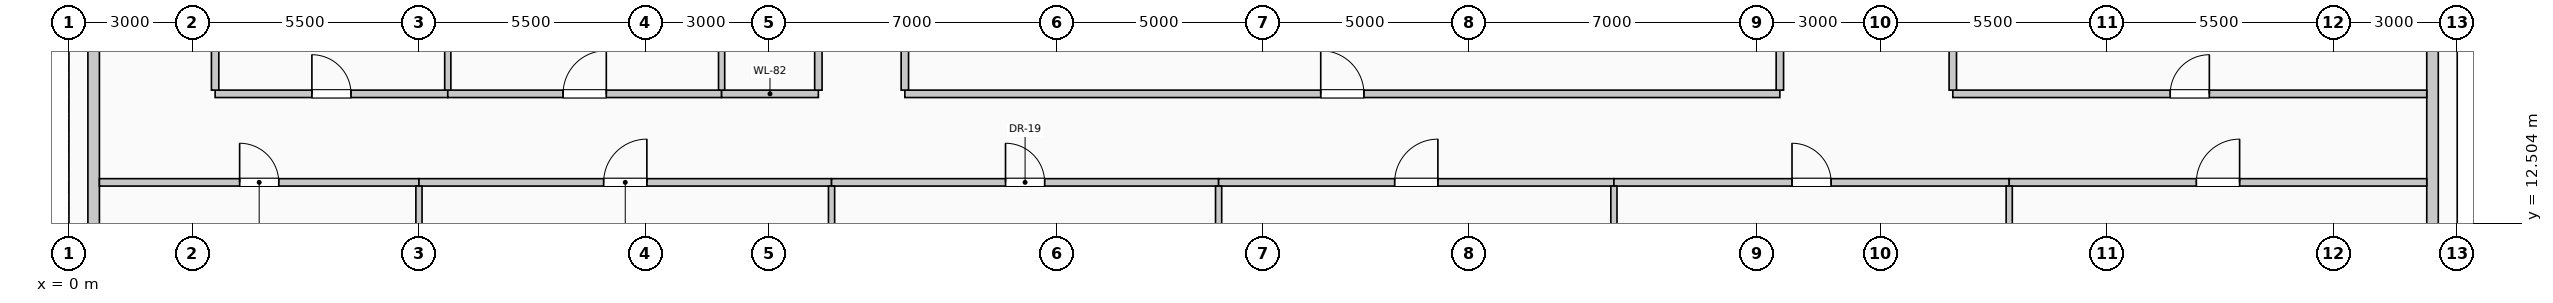
"""IFC4 building model, lengths in metres.
Left out: names, types, materials, properties, quantities, classifications, styles, units other than length and angle.
Written with IfcOpenShell. Run it as: python <this file> out.ifc"""

import sys

from ifc_helpers import new_model, si_unit, direction, frame, frame_2d, origin, place, context, subcontext, project, spatial, rectangle, extrude, element, fill, save


model = new_model("IFC4")
c1 = context("Model", 3, precision=1e-05, world=origin(), true_north=direction((0.0, 1.0)))
c2 = subcontext(c1, "Body", "Model", "MODEL_VIEW")
j1 = project(units=[si_unit("LENGTHUNIT", "METRE"), si_unit("PLANEANGLEUNIT", "RADIAN")], contexts=[c1])
p1 = place(None, origin())
s1 = spatial("IfcSite", under=j1, at=p1, CompositionType="ELEMENT")
p2 = place(p1, origin())
s2 = spatial("IfcBuilding", under=s1, at=p2, CompositionType="ELEMENT")
p3 = place(p2, frame((0.0, 0.0, 96.6)))
s3 = spatial("IfcBuildingStorey", under=s2, at=p3, CompositionType="ELEMENT", Elevation=96.6)
for number, where, z_axis, x_axis in (
    (1, (0.6, 10.445, 0.0), (0.0, 0.0, 1.0), (0.0, 1.0, 0.0)),
    (2, (57.4, 17.555, 0.0), (0.0, 0.0, 1.0), (0.0, -1.0, 0.0)),
):
    element("IfcWall", number, at=place(p3, frame(where, z_axis=z_axis, x_axis=x_axis)), inside=s3, PredefinedType="SOLIDWALL", context=c2, shape_type="SweptSolid", body=[
        extrude(rectangle(XDim=7.11, YDim=0.28, at=frame_2d((3.555, 0.0))), origin(), (0.0, 0.0, 1.0), 2.875),
    ])
p4 = place(p3, frame((0.74, 13.5, 0.0), z_axis=(0.0, 0.0, 1.0), x_axis=(1.0, 0.0, 0.0)))
e3 = element("IfcWall", 3, at=p4, inside=s3, PredefinedType="PARTITIONING", context=c2, shape_type="SweptSolid", body=[
    extrude(rectangle(XDim=7.76, YDim=0.18, at=frame_2d((3.88, 0.0))), origin(), (0.0, 0.0, 1.0), 3.725),
])
p5 = place(p4, frame((3.405, 0.0, 0.0)))
e4 = element("IfcOpeningElement", 4, at=p5, cuts=e3, PredefinedType="OPENING", context=c2, shape_type="SweptSolid", body=[
    extrude(rectangle(XDim=0.95, YDim=2.15, at=frame_2d((0.475, 1.075))), frame((0.0, 0.1, 0.0), z_axis=(0.0, -1.0, 0.0), x_axis=(1.0, 0.0, 0.0)), (0.0, 0.0, 1.0), 0.2),
])
p6 = place(p3, frame((8.5, 13.5, 0.0), z_axis=(0.0, 0.0, 1.0), x_axis=(1.0, 0.0, 0.0)))
e5 = element("IfcWall", 5, at=p6, inside=s3, PredefinedType="PARTITIONING", context=c2, shape_type="SweptSolid", body=[
    extrude(rectangle(XDim=10.02, YDim=0.18, at=frame_2d((5.01, 0.0))), origin(), (0.0, 0.0, 1.0), 3.725),
])
p7 = place(p6, frame((4.485, 0.0, 0.0)))
e6 = element("IfcOpeningElement", 6, at=p7, cuts=e5, PredefinedType="OPENING", context=c2, shape_type="SweptSolid", body=[
    extrude(rectangle(XDim=1.05, YDim=2.15, at=frame_2d((0.525, 1.075))), frame((0.0, 0.1, 0.0), z_axis=(0.0, -1.0, 0.0), x_axis=(1.0, 0.0, 0.0)), (0.0, 0.0, 1.0), 0.2),
])
p8 = place(p3, frame((18.52, 13.5, 0.0), z_axis=(0.0, 0.0, 1.0), x_axis=(1.0, 0.0, 0.0)))
e7 = element("IfcWall", 7, at=p8, inside=s3, PredefinedType="PARTITIONING", context=c2, shape_type="SweptSolid", body=[
    extrude(rectangle(XDim=9.4, YDim=0.18, at=frame_2d((4.7, 0.0))), origin(), (0.0, 0.0, 1.0), 3.725),
])
p9 = place(p8, frame((4.225, 0.0, 0.0)))
e8 = element("IfcOpeningElement", 8, at=p9, cuts=e7, PredefinedType="OPENING", context=c2, shape_type="SweptSolid", body=[
    extrude(rectangle(XDim=0.95, YDim=2.15, at=frame_2d((0.475, 1.075))), frame((0.0, 0.1, 0.0), z_axis=(0.0, -1.0, 0.0), x_axis=(1.0, 0.0, 0.0)), (0.0, 0.0, 1.0), 0.2),
])
p10 = place(p3, frame((27.92, 13.5, 0.0), z_axis=(0.0, 0.0, 1.0), x_axis=(1.0, 0.0, 0.0)))
e9 = element("IfcWall", 9, at=p10, inside=s3, PredefinedType="PARTITIONING", context=c2, shape_type="SweptSolid", body=[
    extrude(rectangle(XDim=9.6, YDim=0.18, at=frame_2d((4.8, 0.0))), origin(), (0.0, 0.0, 1.0), 3.725),
])
p11 = place(p10, frame((4.275, 0.0, 0.0)))
e10 = element("IfcOpeningElement", 10, at=p11, cuts=e9, PredefinedType="OPENING", context=c2, shape_type="SweptSolid", body=[
    extrude(rectangle(XDim=1.05, YDim=2.15, at=frame_2d((0.525, 1.075))), frame((0.0, 0.1, 0.0), z_axis=(0.0, -1.0, 0.0), x_axis=(1.0, 0.0, 0.0)), (0.0, 0.0, 1.0), 0.2),
])
p12 = place(p3, frame((37.52, 13.5, 0.0), z_axis=(0.0, 0.0, 1.0), x_axis=(1.0, 0.0, 0.0)))
e11 = element("IfcWall", 11, at=p12, inside=s3, PredefinedType="PARTITIONING", context=c2, shape_type="SweptSolid", body=[
    extrude(rectangle(XDim=9.6, YDim=0.18, at=frame_2d((4.8, 0.0))), origin(), (0.0, 0.0, 1.0), 3.725),
])
p13 = place(p12, frame((4.325, 0.0, 0.0)))
e12 = element("IfcOpeningElement", 12, at=p13, cuts=e11, PredefinedType="OPENING", context=c2, shape_type="SweptSolid", body=[
    extrude(rectangle(XDim=0.95, YDim=2.15, at=frame_2d((0.475, 1.075))), frame((0.0, 0.1, 0.0), z_axis=(0.0, -1.0, 0.0), x_axis=(1.0, 0.0, 0.0)), (0.0, 0.0, 1.0), 0.2),
])
p14 = place(p3, frame((47.12, 13.5, 0.0), z_axis=(0.0, 0.0, 1.0), x_axis=(1.0, 0.0, 0.0)))
e13 = element("IfcWall", 13, at=p14, inside=s3, PredefinedType="PARTITIONING", context=c2, shape_type="SweptSolid", body=[
    extrude(rectangle(XDim=10.14, YDim=0.18, at=frame_2d((5.07, 0.0))), origin(), (0.0, 0.0, 1.0), 3.725),
])
p15 = place(p14, frame((4.545, 0.0, 0.0)))
e14 = element("IfcOpeningElement", 14, at=p15, cuts=e13, PredefinedType="OPENING", context=c2, shape_type="SweptSolid", body=[
    extrude(rectangle(XDim=1.05, YDim=2.15, at=frame_2d((0.525, 1.075))), frame((0.0, 0.1, 0.0), z_axis=(0.0, -1.0, 0.0), x_axis=(1.0, 0.0, 0.0)), (0.0, 0.0, 1.0), 0.2),
])
p16 = place(p3, frame((3.55, 15.65, 0.0), z_axis=(0.0, 0.0, 1.0), x_axis=(1.0, 0.0, 0.0)))
e15 = element("IfcWall", 15, at=p16, inside=s3, PredefinedType="PARTITIONING", context=c2, shape_type="SweptSolid", body=[
    extrude(rectangle(XDim=5.65, YDim=0.18, at=frame_2d((2.825, 0.0))), origin(), (0.0, 0.0, 1.0), 3.725),
])
p17 = place(p16, frame((2.35, 0.0, 0.0)))
e16 = element("IfcOpeningElement", 16, at=p17, cuts=e15, PredefinedType="OPENING", context=c2, shape_type="SweptSolid", body=[
    extrude(rectangle(XDim=0.95, YDim=2.15, at=frame_2d((0.475, 1.075))), frame((0.0, 0.1, 0.0), z_axis=(0.0, -1.0, 0.0), x_axis=(1.0, 0.0, 0.0)), (0.0, 0.0, 1.0), 0.2),
])
p18 = place(p3, frame((9.2, 15.65, 0.0), z_axis=(0.0, 0.0, 1.0), x_axis=(1.0, 0.0, 0.0)))
e17 = element("IfcWall", 17, at=p18, inside=s3, PredefinedType="PARTITIONING", context=c2, shape_type="SweptSolid", body=[
    extrude(rectangle(XDim=6.65, YDim=0.18, at=frame_2d((3.325, 0.0))), origin(), (0.0, 0.0, 1.0), 3.725),
])
p19 = place(p18, frame((2.8, 0.0, 0.0)))
e18 = element("IfcOpeningElement", 18, at=p19, cuts=e17, PredefinedType="OPENING", context=c2, shape_type="SweptSolid", body=[
    extrude(rectangle(XDim=1.05, YDim=2.15, at=frame_2d((0.525, 1.075))), frame((0.0, 0.1, 0.0), z_axis=(0.0, -1.0, 0.0), x_axis=(1.0, 0.0, 0.0)), (0.0, 0.0, 1.0), 0.2),
])
p20 = place(p3, frame((15.85, 15.65, 0.0), z_axis=(0.0, 0.0, 1.0), x_axis=(1.0, 0.0, 0.0)))
e19 = element("IfcWall", 19, at=p20, inside=s3, PredefinedType="PARTITIONING", context=c2, shape_type="SweptSolid", body=[
    extrude(rectangle(XDim=2.35, YDim=0.18, at=frame_2d((1.175, 0.0))), origin(), (0.0, 0.0, 1.0), 3.725),
])
p21 = place(p3, frame((20.3, 15.65, 0.0), z_axis=(0.0, 0.0, 1.0), x_axis=(1.0, 0.0, 0.0)))
e20 = element("IfcWall", 20, at=p21, inside=s3, PredefinedType="PARTITIONING", context=c2, shape_type="SweptSolid", body=[
    extrude(rectangle(XDim=21.25, YDim=0.18, at=frame_2d((10.625, 0.0))), origin(), (0.0, 0.0, 1.0), 3.725),
])
p22 = place(p21, frame((10.1, 0.0, 0.0)))
e21 = element("IfcOpeningElement", 21, at=p22, cuts=e20, PredefinedType="OPENING", context=c2, shape_type="SweptSolid", body=[
    extrude(rectangle(XDim=1.05, YDim=2.15, at=frame_2d((0.525, 1.075))), frame((0.0, 0.1, 0.0), z_axis=(0.0, -1.0, 0.0), x_axis=(1.0, 0.0, 0.0)), (0.0, 0.0, 1.0), 0.2),
])
p23 = place(p3, frame((45.75, 15.65, 0.0), z_axis=(0.0, 0.0, 1.0), x_axis=(1.0, 0.0, 0.0)))
e22 = element("IfcWall", 22, at=p23, inside=s3, PredefinedType="PARTITIONING", context=c2, shape_type="SweptSolid", body=[
    extrude(rectangle(XDim=11.51, YDim=0.18, at=frame_2d((5.755, 0.0))), origin(), (0.0, 0.0, 1.0), 3.725),
])
p24 = place(p23, frame((5.28, 0.0, 0.0)))
e23 = element("IfcOpeningElement", 23, at=p24, cuts=e22, PredefinedType="OPENING", context=c2, shape_type="SweptSolid", body=[
    extrude(rectangle(XDim=0.95, YDim=2.15, at=frame_2d((0.475, 1.075))), frame((0.0, 0.1, 0.0), z_axis=(0.0, -1.0, 0.0), x_axis=(1.0, 0.0, 0.0)), (0.0, 0.0, 1.0), 0.2),
])
p25 = place(p3, frame((3.55, 15.74, 0.0), z_axis=(0.0, 0.0, 1.0), x_axis=(0.0, 1.0, 0.0)))
e24 = element("IfcWall", 24, at=p25, inside=s3, PredefinedType="PARTITIONING", context=c2, shape_type="SweptSolid", body=[
    extrude(rectangle(XDim=3.135, YDim=0.18, at=frame_2d((1.567, 0.0))), origin(), (0.0, 0.0, 1.0), 3.725),
])
p26 = place(p3, frame((8.5, 1.175, 0.0), z_axis=(0.0, 0.0, 1.0), x_axis=(0.0, 1.0, 0.0)))
e25 = element("IfcWall", 25, at=p26, inside=s3, PredefinedType="PARTITIONING", context=c2, shape_type="SweptSolid", body=[
    extrude(rectangle(XDim=12.235, YDim=0.15, at=frame_2d((6.117, 0.0))), origin(), (0.0, 0.0, 1.0), 3.725),
])
p27 = place(p3, frame((9.2, 15.74, 0.0), z_axis=(0.0, 0.0, 1.0), x_axis=(0.0, 1.0, 0.0)))
e26 = element("IfcWall", 26, at=p27, inside=s3, PredefinedType="PARTITIONING", context=c2, shape_type="SweptSolid", body=[
    extrude(rectangle(XDim=3.135, YDim=0.15, at=frame_2d((1.567, 0.0))), origin(), (0.0, 0.0, 1.0), 3.725),
])
p28 = place(p3, frame((15.85, 15.74, 0.0), z_axis=(0.0, 0.0, 1.0), x_axis=(0.0, 1.0, 0.0)))
e27 = element("IfcWall", 27, at=p28, inside=s3, PredefinedType="PARTITIONING", context=c2, shape_type="SweptSolid", body=[
    extrude(rectangle(XDim=1.76, YDim=0.15, at=frame_2d((0.88, 0.0))), origin(), (0.0, 0.0, 1.0), 3.725),
])
p29 = place(p3, frame((18.2, 15.74, 0.0), z_axis=(0.0, 0.0, 1.0), x_axis=(0.0, 1.0, 0.0)))
e28 = element("IfcWall", 28, at=p29, inside=s3, PredefinedType="PARTITIONING", context=c2, shape_type="SweptSolid", body=[
    extrude(rectangle(XDim=14.37, YDim=0.18, at=frame_2d((7.185, 0.0))), origin(), (0.0, 0.0, 1.0), 3.725),
])
p30 = place(p3, frame((18.52, 0.74, 0.0), z_axis=(0.0, 0.0, 1.0), x_axis=(0.0, 1.0, 0.0)))
e29 = element("IfcWall", 29, at=p30, inside=s3, PredefinedType="PARTITIONING", context=c2, shape_type="SweptSolid", body=[
    extrude(rectangle(XDim=12.67, YDim=0.15, at=frame_2d((6.335, 0.0))), origin(), (0.0, 0.0, 1.0), 3.725),
])
p31 = place(p3, frame((20.3, 15.74, 0.0), z_axis=(0.0, 0.0, 1.0), x_axis=(0.0, 1.0, 0.0)))
e30 = element("IfcWall", 30, at=p31, inside=s3, PredefinedType="PARTITIONING", context=c2, shape_type="SweptSolid", body=[
    extrude(rectangle(XDim=14.37, YDim=0.18, at=frame_2d((7.185, 0.0))), origin(), (0.0, 0.0, 1.0), 3.725),
])
for number, where, z_axis, x_axis in (
    (31, (27.92, 0.74, 0.0), (0.0, 0.0, 1.0), (0.0, 1.0, 0.0)),
    (32, (37.52, 0.74, 0.0), (0.0, 0.0, 1.0), (0.0, 1.0, 0.0)),
):
    element("IfcWall", number, at=place(p3, frame(where, z_axis=z_axis, x_axis=x_axis)), inside=s3, PredefinedType="PARTITIONING", context=c2, shape_type="SweptSolid", body=[
        extrude(rectangle(XDim=12.67, YDim=0.15, at=frame_2d((6.335, 0.0))), origin(), (0.0, 0.0, 1.0), 3.725),
    ])
p32 = place(p3, frame((41.55, 15.74, 0.0), z_axis=(0.0, 0.0, 1.0), x_axis=(0.0, 1.0, 0.0)))
e33 = element("IfcWall", 33, at=p32, inside=s3, PredefinedType="PARTITIONING", context=c2, shape_type="SweptSolid", body=[
    extrude(rectangle(XDim=1.76, YDim=0.18, at=frame_2d((0.88, 0.0))), origin(), (0.0, 0.0, 1.0), 3.07),
])
p33 = place(p3, frame((45.75, 15.74, 0.0), z_axis=(0.0, 0.0, 1.0), x_axis=(0.0, 1.0, 0.0)))
e34 = element("IfcWall", 34, at=p33, inside=s3, PredefinedType="PARTITIONING", context=c2, shape_type="SweptSolid", body=[
    extrude(rectangle(XDim=9.335, YDim=0.18, at=frame_2d((4.667, 0.0))), origin(), (0.0, 0.0, 1.0), 3.725),
])
p34 = place(p3, frame((47.12, 0.74, 0.0), z_axis=(0.0, 0.0, 1.0), x_axis=(0.0, 1.0, 0.0)))
e35 = element("IfcWall", 35, at=p34, inside=s3, PredefinedType="PARTITIONING", context=c2, shape_type="SweptSolid", body=[
    extrude(rectangle(XDim=12.67, YDim=0.15, at=frame_2d((6.335, 0.0))), origin(), (0.0, 0.0, 1.0), 3.725),
])
p35 = place(p5, origin())
e36 = element("IfcDoor", 36, at=p35, inside=s3, OperationType="SINGLE_SWING_LEFT", PredefinedType="DOOR", context=c2, shape_type="SweptSolid", body=[
    extrude(rectangle(XDim=0.95, YDim=2.15, at=frame_2d((0.475, 1.075))), frame((0.0, 0.025, 0.0), z_axis=(0.0, -1.0, 0.0), x_axis=(1.0, 0.0, 0.0)), (0.0, 0.0, 1.0), 0.05),
])
fill(e4, e36)
p36 = place(p7, origin())
e37 = element("IfcDoor", 37, at=p36, inside=s3, OperationType="SINGLE_SWING_RIGHT", PredefinedType="DOOR", context=c2, shape_type="SweptSolid", body=[
    extrude(rectangle(XDim=1.05, YDim=2.15, at=frame_2d((0.525, 1.075))), frame((0.0, 0.025, 0.0), z_axis=(0.0, -1.0, 0.0), x_axis=(1.0, 0.0, 0.0)), (0.0, 0.0, 1.0), 0.05),
])
fill(e6, e37)
p37 = place(p9, origin())
e38 = element("IfcDoor", 38, at=p37, inside=s3, OperationType="SINGLE_SWING_LEFT", PredefinedType="DOOR", context=c2, shape_type="SweptSolid", body=[
    extrude(rectangle(XDim=0.95, YDim=2.15, at=frame_2d((0.475, 1.075))), frame((0.0, 0.025, 0.0), z_axis=(0.0, -1.0, 0.0), x_axis=(1.0, 0.0, 0.0)), (0.0, 0.0, 1.0), 0.05),
])
fill(e8, e38)
p38 = place(p11, origin())
e39 = element("IfcDoor", 39, at=p38, inside=s3, OperationType="SINGLE_SWING_RIGHT", PredefinedType="DOOR", context=c2, shape_type="SweptSolid", body=[
    extrude(rectangle(XDim=1.05, YDim=2.15, at=frame_2d((0.525, 1.075))), frame((0.0, 0.025, 0.0), z_axis=(0.0, -1.0, 0.0), x_axis=(1.0, 0.0, 0.0)), (0.0, 0.0, 1.0), 0.05),
])
fill(e10, e39)
p39 = place(p13, origin())
e40 = element("IfcDoor", 40, at=p39, inside=s3, OperationType="SINGLE_SWING_LEFT", PredefinedType="DOOR", context=c2, shape_type="SweptSolid", body=[
    extrude(rectangle(XDim=0.95, YDim=2.15, at=frame_2d((0.475, 1.075))), frame((0.0, 0.025, 0.0), z_axis=(0.0, -1.0, 0.0), x_axis=(1.0, 0.0, 0.0)), (0.0, 0.0, 1.0), 0.05),
])
fill(e12, e40)
p40 = place(p15, origin())
e41 = element("IfcDoor", 41, at=p40, inside=s3, OperationType="SINGLE_SWING_RIGHT", PredefinedType="DOOR", context=c2, shape_type="SweptSolid", body=[
    extrude(rectangle(XDim=1.05, YDim=2.15, at=frame_2d((0.525, 1.075))), frame((0.0, 0.025, 0.0), z_axis=(0.0, -1.0, 0.0), x_axis=(1.0, 0.0, 0.0)), (0.0, 0.0, 1.0), 0.05),
])
fill(e14, e41)
p41 = place(p17, origin())
e42 = element("IfcDoor", 42, at=p41, inside=s3, OperationType="SINGLE_SWING_LEFT", PredefinedType="DOOR", context=c2, shape_type="SweptSolid", body=[
    extrude(rectangle(XDim=0.95, YDim=2.15, at=frame_2d((0.475, 1.075))), frame((0.0, 0.025, 0.0), z_axis=(0.0, -1.0, 0.0), x_axis=(1.0, 0.0, 0.0)), (0.0, 0.0, 1.0), 0.05),
])
fill(e16, e42)
p42 = place(p19, origin())
e43 = element("IfcDoor", 43, at=p42, inside=s3, OperationType="SINGLE_SWING_RIGHT", PredefinedType="DOOR", context=c2, shape_type="SweptSolid", body=[
    extrude(rectangle(XDim=1.05, YDim=2.15, at=frame_2d((0.525, 1.075))), frame((0.0, 0.025, 0.0), z_axis=(0.0, -1.0, 0.0), x_axis=(1.0, 0.0, 0.0)), (0.0, 0.0, 1.0), 0.05),
])
fill(e18, e43)
p43 = place(p22, origin())
e44 = element("IfcDoor", 44, at=p43, inside=s3, OperationType="SINGLE_SWING_LEFT", PredefinedType="DOOR", context=c2, shape_type="SweptSolid", body=[
    extrude(rectangle(XDim=1.05, YDim=2.15, at=frame_2d((0.525, 1.075))), frame((0.0, 0.025, 0.0), z_axis=(0.0, -1.0, 0.0), x_axis=(1.0, 0.0, 0.0)), (0.0, 0.0, 1.0), 0.05),
])
fill(e21, e44)
p44 = place(p24, origin())
e45 = element("IfcDoor", 45, at=p44, inside=s3, OperationType="SINGLE_SWING_RIGHT", PredefinedType="DOOR", context=c2, shape_type="SweptSolid", body=[
    extrude(rectangle(XDim=0.95, YDim=2.15, at=frame_2d((0.475, 1.075))), frame((0.0, 0.025, 0.0), z_axis=(0.0, -1.0, 0.0), x_axis=(1.0, 0.0, 0.0)), (0.0, 0.0, 1.0), 0.05),
])
fill(e23, e45)
save(model, sys.argv[1])
